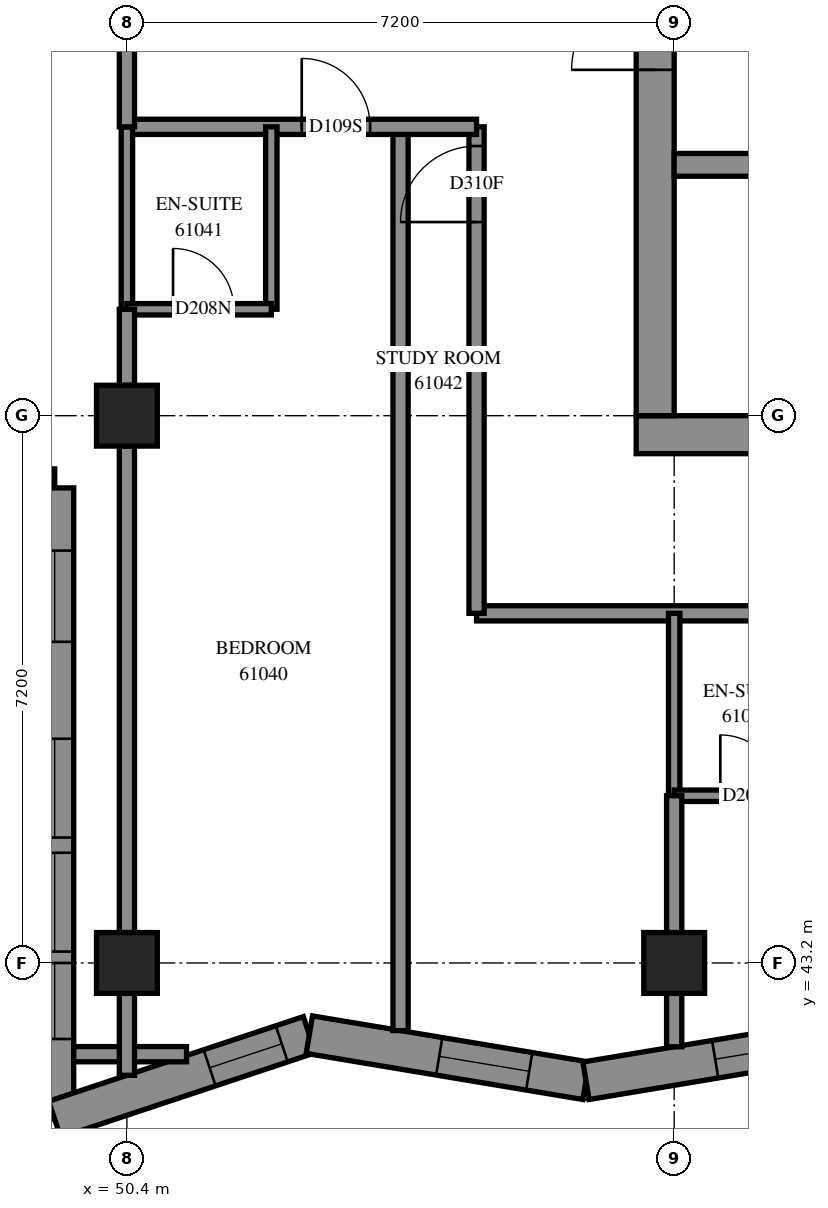
"""IFC4 building model, lengths in metres.
Left out: names, types, materials, properties, quantities, classifications, styles, units other than length and angle.
Written with IfcOpenShell. Run it as: python <this file> out.ifc"""

import sys

from ifc_helpers import new_model, si_unit, direction, frame, frame_2d, origin, origin_2d, place, context, subcontext, project, spatial, polyline, rectangle, outline, extrude, element, fill, save


model = new_model("IFC4")
c1 = context("Model", 3, precision=1e-05, world=origin(), true_north=direction((0.0, 1.0)))
c2 = subcontext(c1, "Body", "Model", "MODEL_VIEW")
j1 = project(units=[si_unit("LENGTHUNIT", "METRE"), si_unit("PLANEANGLEUNIT", "RADIAN")], contexts=[c1])
p1 = place(None, origin())
s1 = spatial("IfcSite", under=j1, at=p1, CompositionType="ELEMENT")
p2 = place(p1, origin())
s2 = spatial("IfcBuilding", under=s1, at=p2, CompositionType="ELEMENT")
p3 = place(p2, frame((0.0, 0.0, 223.6)))
s3 = spatial("IfcBuildingStorey", under=s2, at=p3, CompositionType="ELEMENT", Elevation=223.6)
for number, where, z_axis, x_axis in (
    (1, (50.4, 43.2, 0.0), (0.0, 0.0, 1.0), (1.0, 0.0, 0.0)),
    (2, (50.4, 50.4, 0.0), (0.0, 0.0, 1.0), (1.0, 0.0, 0.0)),
    (3, (57.6, 43.2, 0.0), (0.0, 0.0, 1.0), (1.0, 0.0, 0.0)),
):
    element("IfcColumn", number, at=place(p3, frame(where, z_axis=z_axis, x_axis=x_axis)), inside=s3, PredefinedType="COLUMN", context=c2, shape_type="SweptSolid", body=[
        extrude(rectangle(XDim=0.8, YDim=0.8, at=origin_2d()), origin(), (0.0, 0.0, 1.0), 3.1),
    ])
p4 = place(p3, frame((57.1, 50.15, -0.3), z_axis=(0.0, 0.0, 1.0), x_axis=(1.0, 0.0, 0.0)))
e4 = element("IfcWall", 4, at=p4, inside=s3, PredefinedType="SHEAR", context=c2, shape_type="SweptSolid", body=[
    extrude(rectangle(XDim=15.4, YDim=0.5, at=frame_2d((7.7, 0.0))), origin(), (0.0, 0.0, 1.0), 2.7),
])
p5 = place(p3, frame((57.35, 50.4, -0.3), z_axis=(0.0, 0.0, 1.0), x_axis=(0.0, 1.0, 0.0)))
e5 = element("IfcWall", 5, at=p5, inside=s3, PredefinedType="SHEAR", context=c2, shape_type="SweptSolid", body=[
    extrude(rectangle(XDim=14.4, YDim=0.5, at=frame_2d((7.2, 0.0))), origin(), (0.0, 0.0, 1.0), 2.7),
])
p6 = place(p5, frame((4.55, 0.0, 0.3)))
e6 = element("IfcOpeningElement", 6, at=p6, cuts=e5, PredefinedType="OPENING", context=c2, shape_type="SweptSolid", body=[
    extrude(rectangle(XDim=1.1, YDim=2.1, at=frame_2d((0.55, 1.05))), frame((0.0, 0.26, 0.0), z_axis=(0.0, -1.0, 0.0), x_axis=(1.0, 0.0, 0.0)), (0.0, 0.0, 1.0), 0.52),
])
p7 = place(p5, frame((11.35, 0.0, 0.3)))
e7 = element("IfcOpeningElement", 7, at=p7, cuts=e5, PredefinedType="OPENING", context=c2, shape_type="SweptSolid", body=[
    extrude(rectangle(XDim=1.1, YDim=2.1, at=frame_2d((0.55, 1.05))), frame((0.0, 0.26, 0.0), z_axis=(0.0, -1.0, 0.0), x_axis=(1.0, 0.0, 0.0)), (0.0, 0.0, 1.0), 0.52),
])
p8 = place(p3, frame((57.6, 53.7, 0.0), z_axis=(0.0, 0.0, 1.0), x_axis=(1.0, 0.0, 0.0)))
e8 = element("IfcWall", 8, at=p8, inside=s3, PredefinedType="SOLIDWALL", context=c2, shape_type="SweptSolid", body=[
    extrude(rectangle(XDim=14.4, YDim=0.3, at=frame_2d((7.2, 0.0))), origin(), (0.0, 0.0, 1.0), 3.1),
])
p9 = place(p8, frame((1.35, 0.0, 0.0)))
e9 = element("IfcOpeningElement", 9, at=p9, cuts=e8, PredefinedType="OPENING", context=c2, shape_type="SweptSolid", body=[
    extrude(rectangle(XDim=0.9, YDim=2.1, at=frame_2d((0.45, 1.05))), frame((0.0, 0.16, 0.0), z_axis=(0.0, -1.0, 0.0), x_axis=(1.0, 0.0, 0.0)), (0.0, 0.0, 1.0), 0.32),
])
p10 = place(p8, frame((4.95, 0.0, 0.0)))
e10 = element("IfcOpeningElement", 10, at=p10, cuts=e8, PredefinedType="OPENING", context=c2, shape_type="SweptSolid", body=[
    extrude(rectangle(XDim=0.9, YDim=2.1, at=frame_2d((0.45, 1.05))), frame((0.0, 0.16, 0.0), z_axis=(0.0, -1.0, 0.0), x_axis=(1.0, 0.0, 0.0)), (0.0, 0.0, 1.0), 0.32),
])
p11 = place(p8, frame((8.55, 0.0, 0.0)))
e11 = element("IfcOpeningElement", 11, at=p11, cuts=e8, PredefinedType="OPENING", context=c2, shape_type="SweptSolid", body=[
    extrude(rectangle(XDim=0.9, YDim=2.1, at=frame_2d((0.45, 1.05))), frame((0.0, 0.16, 0.0), z_axis=(0.0, -1.0, 0.0), x_axis=(1.0, 0.0, 0.0)), (0.0, 0.0, 1.0), 0.32),
])
p12 = place(p8, frame((12.05, 0.0, 0.0)))
e12 = element("IfcOpeningElement", 12, at=p12, cuts=e8, PredefinedType="OPENING", context=c2, shape_type="SweptSolid", body=[
    extrude(rectangle(XDim=1.1, YDim=2.1, at=frame_2d((0.55, 1.05))), frame((0.0, 0.16, 0.0), z_axis=(0.0, -1.0, 0.0), x_axis=(1.0, 0.0, 0.0)), (0.0, 0.0, 1.0), 0.32),
])
p13 = place(p3, frame((42.25, 49.45, 0.0), z_axis=(0.0, 0.0, 1.0), x_axis=(1.0, 0.0, 0.0)))
e13 = element("IfcWall", 13, at=p13, inside=s3, PredefinedType="SOLIDWALL", context=c2, shape_type="SweptSolid", body=[
    extrude(outline(polyline([(-0.25, -0.25), (6.95, -0.25), (7.45, 0.25), (0.25, 0.25), (-0.25, -0.25)])), origin(), (0.0, 0.0, 1.0), 3.1),
])
p14 = place(p13, frame((1.35, 0.0, 0.45)))
e14 = element("IfcOpeningElement", 14, at=p14, cuts=e13, PredefinedType="OPENING", context=c2, shape_type="SweptSolid", body=[
    extrude(rectangle(XDim=1.3, YDim=2.5, at=frame_2d((0.65, 1.25))), frame((0.0, 0.26, 0.0), z_axis=(0.0, -1.0, 0.0), x_axis=(1.0, 0.0, 0.0)), (0.0, 0.0, 1.0), 0.52),
])
p15 = place(p13, frame((2.85, 0.0, 0.45)))
e15 = element("IfcOpeningElement", 15, at=p15, cuts=e13, PredefinedType="OPENING", context=c2, shape_type="SweptSolid", body=[
    extrude(rectangle(XDim=1.3, YDim=2.5, at=frame_2d((0.65, 1.25))), frame((0.0, 0.26, 0.0), z_axis=(0.0, -1.0, 0.0), x_axis=(1.0, 0.0, 0.0)), (0.0, 0.0, 1.0), 0.52),
])
p16 = place(p13, frame((5.175, 0.0, 0.45)))
e16 = element("IfcOpeningElement", 16, at=p16, cuts=e13, PredefinedType="OPENING", context=c2, shape_type="SweptSolid", body=[
    extrude(rectangle(XDim=1.2, YDim=2.5, at=frame_2d((0.6, 1.25))), frame((0.0, 0.26, 0.0), z_axis=(0.0, -1.0, 0.0), x_axis=(1.0, 0.0, 0.0)), (0.0, 0.0, 1.0), 0.52),
])
p17 = place(p3, frame((49.45, 49.45, 0.0), z_axis=(0.0, 0.0, 1.0), x_axis=(0.0, -1.0, 0.0)))
e17 = element("IfcWall", 17, at=p17, inside=s3, PredefinedType="SOLIDWALL", context=c2, shape_type="SweptSolid", body=[
    extrude(outline(polyline([(0.25, -0.25), (8.653, -0.25), (7.96, 0.25), (-0.25, 0.25), (0.25, -0.25)])), origin(), (0.0, 0.0, 1.0), 3.1),
])
p18 = place(p17, frame((3.3, 0.0, 0.45)))
e18 = element("IfcOpeningElement", 18, at=p18, cuts=e17, PredefinedType="OPENING", context=c2, shape_type="SweptSolid", body=[
    extrude(rectangle(XDim=1.3, YDim=2.5, at=frame_2d((0.65, 1.25))), frame((0.0, 0.26, 0.0), z_axis=(0.0, -1.0, 0.0), x_axis=(1.0, 0.0, 0.0)), (0.0, 0.0, 1.0), 0.52),
])
p19 = place(p17, frame((4.8, 0.0, 0.45)))
e19 = element("IfcOpeningElement", 19, at=p19, cuts=e17, PredefinedType="OPENING", context=c2, shape_type="SweptSolid", body=[
    extrude(rectangle(XDim=1.3, YDim=2.5, at=frame_2d((0.65, 1.25))), frame((0.0, 0.26, 0.0), z_axis=(0.0, -1.0, 0.0), x_axis=(1.0, 0.0, 0.0)), (0.0, 0.0, 1.0), 0.52),
])
p20 = place(p17, frame((0.825, 0.0, 0.45)))
e20 = element("IfcOpeningElement", 20, at=p20, cuts=e17, PredefinedType="OPENING", context=c2, shape_type="SweptSolid", body=[
    extrude(rectangle(XDim=1.2, YDim=2.5, at=frame_2d((0.6, 1.25))), frame((0.0, 0.26, 0.0), z_axis=(0.0, -1.0, 0.0), x_axis=(1.0, 0.0, 0.0)), (0.0, 0.0, 1.0), 0.52),
])
p21 = place(p17, frame((6.25, 0.0, 0.45)))
e21 = element("IfcOpeningElement", 21, at=p21, cuts=e17, PredefinedType="OPENING", context=c2, shape_type="SweptSolid", body=[
    extrude(rectangle(XDim=1.0, YDim=2.5, at=frame_2d((0.5, 1.25))), frame((0.0, 0.26, 0.0), z_axis=(0.0, -1.0, 0.0), x_axis=(1.0, 0.0, 0.0)), (0.0, 0.0, 1.0), 0.52),
])
p22 = place(p3, frame((49.45, 41.144, 0.0), z_axis=(0.0, 0.0, 1.0), x_axis=(0.9489633816, 0.3153862716, 0.0)))
e22 = element("IfcWall", 22, at=p22, inside=s3, PredefinedType="SOLIDWALL", context=c2, shape_type="SweptSolid", body=[
    extrude(outline(polyline([(-0.346, -0.25), (3.468, -0.25), (3.592, 0.25), (0.346, 0.25), (-0.346, -0.25)])), origin(), (0.0, 0.0, 1.0), 3.1),
])
p23 = place(p22, frame((2.148, 0.0, 0.45)))
e23 = element("IfcOpeningElement", 23, at=p23, cuts=e22, PredefinedType="OPENING", context=c2, shape_type="SweptSolid", body=[
    extrude(rectangle(XDim=1.0, YDim=2.5, at=frame_2d((0.5, 1.25))), frame((0.0, 0.26, 0.0), z_axis=(0.0, -1.0, 0.0), x_axis=(1.0, 0.0, 0.0)), (0.0, 0.0, 1.0), 0.52),
])
p24 = place(p3, frame((52.8, 42.257, 0.0), z_axis=(0.0, 0.0, 1.0), x_axis=(0.986404908, -0.1643330686, 0.0)))
e24 = element("IfcWall", 24, at=p24, inside=s3, PredefinedType="SOLIDWALL", context=c2, shape_type="SweptSolid", body=[
    extrude(outline(polyline([(0.062, -0.25), (3.732, -0.25), (3.648, 0.25), (-0.062, 0.25), (0.062, -0.25)])), origin(), (0.0, 0.0, 1.0), 3.1),
])
p25 = place(p24, frame((1.733, 0.0, 0.45)))
e25 = element("IfcOpeningElement", 25, at=p25, cuts=e24, PredefinedType="OPENING", context=c2, shape_type="SweptSolid", body=[
    extrude(rectangle(XDim=1.2, YDim=2.5, at=frame_2d((0.6, 1.25))), frame((0.0, 0.26, 0.0), z_axis=(0.0, -1.0, 0.0), x_axis=(1.0, 0.0, 0.0)), (0.0, 0.0, 1.0), 0.52),
])
p26 = place(p3, frame((56.44, 41.65, 0.0), z_axis=(0.0, 0.0, 1.0), x_axis=(0.9864079133, 0.1643150285, 0.0)))
e26 = element("IfcWall", 26, at=p26, inside=s3, PredefinedType="SOLIDWALL", context=c2, shape_type="SweptSolid", body=[
    extrude(outline(polyline([(-0.042, -0.25), (3.628, -0.25), (3.711, 0.25), (0.042, 0.25), (-0.042, -0.25)])), origin(), (0.0, 0.0, 1.0), 3.1),
])
p27 = place(p26, frame((1.723, 0.0, 0.45)))
e27 = element("IfcOpeningElement", 27, at=p27, cuts=e26, PredefinedType="OPENING", context=c2, shape_type="SweptSolid", body=[
    extrude(rectangle(XDim=1.2, YDim=2.5, at=frame_2d((0.6, 1.25))), frame((0.0, 0.26, 0.0), z_axis=(0.0, -1.0, 0.0), x_axis=(1.0, 0.0, 0.0)), (0.0, 0.0, 1.0), 0.52),
])
p28 = place(p3, frame((55.0, 47.8, 0.0), z_axis=(0.0, 0.0, 1.0), x_axis=(1.0, 0.0, 0.0)))
e28 = element("IfcWall", 28, at=p28, inside=s3, PredefinedType="PARTITIONING", context=c2, shape_type="SweptSolid", body=[
    extrude(rectangle(XDim=19.266, YDim=0.2, at=frame_2d((9.633, 0.0))), origin(), (0.0, 0.0, 1.0), 3.1),
])
p29 = place(p28, frame((4.9, 0.0, 0.0)))
e29 = element("IfcOpeningElement", 29, at=p29, cuts=e28, PredefinedType="OPENING", context=c2, shape_type="SweptSolid", body=[
    extrude(rectangle(XDim=0.9, YDim=2.1, at=frame_2d((0.45, 1.05))), frame((0.0, 0.11, 0.0), z_axis=(0.0, -1.0, 0.0), x_axis=(1.0, 0.0, 0.0)), (0.0, 0.0, 1.0), 0.22),
])
p30 = place(p28, frame((6.6, 0.0, 0.0)))
e30 = element("IfcOpeningElement", 30, at=p30, cuts=e28, PredefinedType="OPENING", context=c2, shape_type="SweptSolid", body=[
    extrude(rectangle(XDim=0.9, YDim=2.1, at=frame_2d((0.45, 1.05))), frame((0.0, 0.11, 0.0), z_axis=(0.0, -1.0, 0.0), x_axis=(1.0, 0.0, 0.0)), (0.0, 0.0, 1.0), 0.22),
])
p31 = place(p28, frame((13.661, 0.0, 0.0)))
e31 = element("IfcOpeningElement", 31, at=p31, cuts=e28, PredefinedType="OPENING", context=c2, shape_type="SweptSolid", body=[
    extrude(rectangle(XDim=0.9, YDim=2.1, at=frame_2d((0.45, 1.05))), frame((0.0, 0.11, 0.0), z_axis=(0.0, -1.0, 0.0), x_axis=(1.0, 0.0, 0.0)), (0.0, 0.0, 1.0), 0.22),
])
p32 = place(p3, frame((54.0, 42.31, 0.0), z_axis=(0.0, 0.0, 1.0), x_axis=(0.0, 1.0, 0.0)))
e32 = element("IfcWall", 32, at=p32, inside=s3, PredefinedType="PARTITIONING", context=c2, shape_type="SweptSolid", body=[
    extrude(rectangle(XDim=11.89, YDim=0.2, at=frame_2d((5.945, 0.0))), origin(), (0.0, 0.0, 1.0), 3.1),
])
p33 = place(p3, frame((55.0, 47.8, 0.0), z_axis=(0.0, 0.0, 1.0), x_axis=(0.0, 1.0, 0.0)))
e33 = element("IfcWall", 33, at=p33, inside=s3, PredefinedType="PARTITIONING", context=c2, shape_type="SweptSolid", body=[
    extrude(rectangle(XDim=6.4, YDim=0.2, at=frame_2d((3.2, 0.0))), origin(), (0.0, 0.0, 1.0), 3.1),
])
p34 = place(p33, frame((5.147, 0.0, 0.0)))
e34 = element("IfcOpeningElement", 34, at=p34, cuts=e33, PredefinedType="OPENING", context=c2, shape_type="SweptSolid", body=[
    extrude(rectangle(XDim=1.0, YDim=2.1, at=frame_2d((0.5, 1.05))), frame((0.0, 0.11, 0.0), z_axis=(0.0, -1.0, 0.0), x_axis=(1.0, 0.0, 0.0)), (0.0, 0.0, 1.0), 0.22),
])
p35 = place(p3, frame((50.4, 43.6, 0.0), z_axis=(0.0, 0.0, 1.0), x_axis=(0.0, 1.0, 0.0)))
e35 = element("IfcWall", 35, at=p35, inside=s3, PredefinedType="PARTITIONING", context=c2, shape_type="SweptSolid", body=[
    extrude(rectangle(XDim=6.4, YDim=0.2, at=frame_2d((3.2, 0.0))), origin(), (0.0, 0.0, 1.0), 2.6),
])
p36 = place(p3, frame((50.4, 54.2, 0.0), z_axis=(0.0, 0.0, 1.0), x_axis=(1.0, 0.0, 0.0)))
e36 = element("IfcWall", 36, at=p36, inside=s3, PredefinedType="PARTITIONING", context=c2, shape_type="SweptSolid", body=[
    extrude(rectangle(XDim=4.6, YDim=0.2, at=frame_2d((2.3, 0.0))), origin(), (0.0, 0.0, 1.0), 3.1),
])
p37 = place(p36, frame((2.3, 0.0, 0.0)))
e37 = element("IfcOpeningElement", 37, at=p37, cuts=e36, PredefinedType="OPENING", context=c2, shape_type="SweptSolid", body=[
    extrude(rectangle(XDim=0.9, YDim=2.1, at=frame_2d((0.45, 1.05))), frame((0.0, 0.11, 0.0), z_axis=(0.0, -1.0, 0.0), x_axis=(1.0, 0.0, 0.0)), (0.0, 0.0, 1.0), 0.22),
])
for number, where, z_axis, x_axis in (
    (38, (52.3, 51.8, 0.0), (0.0, 0.0, 1.0), (0.0, 1.0, 0.0)),
    (39, (50.4, 51.8, 0.0), (0.0, 0.0, 1.0), (0.0, 1.0, 0.0)),
    (40, (57.6, 45.4, 0.0), (0.0, 0.0, 1.0), (0.0, 1.0, 0.0)),
):
    element("IfcWall", number, at=place(p3, frame(where, z_axis=z_axis, x_axis=x_axis)), inside=s3, PredefinedType="PARTITIONING", context=c2, shape_type="SweptSolid", body=[
        extrude(rectangle(XDim=2.4, YDim=0.15, at=frame_2d((1.2, 0.0))), origin(), (0.0, 0.0, 1.0), 3.1),
    ])
p38 = place(p3, frame((50.4, 54.2, 0.0), z_axis=(0.0, 0.0, 1.0), x_axis=(0.0, 1.0, 0.0)))
e41 = element("IfcWall", 41, at=p38, inside=s3, PredefinedType="PARTITIONING", context=c2, shape_type="SweptSolid", body=[
    extrude(rectangle(XDim=2.0, YDim=0.2, at=frame_2d((1.0, 0.0))), origin(), (0.0, 0.0, 1.0), 3.1),
])
p39 = place(p3, frame((50.4, 51.8, 0.0), z_axis=(0.0, 0.0, 1.0), x_axis=(1.0, 0.0, 0.0)))
e42 = element("IfcWall", 42, at=p39, inside=s3, PredefinedType="PARTITIONING", context=c2, shape_type="SweptSolid", body=[
    extrude(rectangle(XDim=1.9, YDim=0.15, at=frame_2d((0.95, 0.0))), origin(), (0.0, 0.0, 1.0), 3.1),
])
p40 = place(p39, frame((0.607, 0.0, 0.0)))
e43 = element("IfcOpeningElement", 43, at=p40, cuts=e42, PredefinedType="OPENING", context=c2, shape_type="SweptSolid", body=[
    extrude(rectangle(XDim=0.8, YDim=2.1, at=frame_2d((0.4, 1.05))), frame((0.0, 0.085, 0.0), z_axis=(0.0, -1.0, 0.0), x_axis=(1.0, 0.0, 0.0)), (0.0, 0.0, 1.0), 0.17),
])
p41 = place(p3, frame((57.6, 45.4, 0.0), z_axis=(0.0, 0.0, 1.0), x_axis=(1.0, 0.0, 0.0)))
e44 = element("IfcWall", 44, at=p41, inside=s3, PredefinedType="PARTITIONING", context=c2, shape_type="SweptSolid", body=[
    extrude(rectangle(XDim=1.9, YDim=0.15, at=frame_2d((0.95, 0.0))), origin(), (0.0, 0.0, 1.0), 3.1),
])
p42 = place(p41, frame((0.607, 0.0, 0.0)))
e45 = element("IfcOpeningElement", 45, at=p42, cuts=e44, PredefinedType="OPENING", context=c2, shape_type="SweptSolid", body=[
    extrude(rectangle(XDim=0.8, YDim=2.1, at=frame_2d((0.4, 1.05))), frame((0.0, 0.085, 0.0), z_axis=(0.0, -1.0, 0.0), x_axis=(1.0, 0.0, 0.0)), (0.0, 0.0, 1.0), 0.17),
])
p43 = place(p3, frame((57.6, 43.6, 0.0), z_axis=(0.0, 0.0, 1.0), x_axis=(0.0, 1.0, 0.0)))
e46 = element("IfcWall", 46, at=p43, inside=s3, PredefinedType="PARTITIONING", context=c2, shape_type="SweptSolid", body=[
    extrude(rectangle(XDim=1.8, YDim=0.2, at=frame_2d((0.9, 0.0))), origin(), (0.0, 0.0, 1.0), 3.1),
])
p44 = place(p3, frame((49.7, 42.0, 0.0), z_axis=(0.0, 0.0, 1.0), x_axis=(1.0, 0.0, 0.0)))
e47 = element("IfcWall", 47, at=p44, inside=s3, PredefinedType="PARTITIONING", context=c2, shape_type="SweptSolid", body=[
    extrude(rectangle(XDim=1.484, YDim=0.2, at=frame_2d((0.742, 0.0))), origin(), (0.0, 0.0, 1.0), 3.1),
])
p45 = place(p3, frame((50.4, 50.8, 0.0), z_axis=(0.0, 0.0, 1.0), x_axis=(0.0, 1.0, 0.0)))
e48 = element("IfcWall", 48, at=p45, inside=s3, PredefinedType="PARTITIONING", context=c2, shape_type="SweptSolid", body=[
    extrude(rectangle(XDim=1.0, YDim=0.2, at=frame_2d((0.5, 0.0))), origin(), (0.0, 0.0, 1.0), 3.1),
])
p46 = place(p3, frame((50.4, 41.723, 0.0), z_axis=(0.0, 0.0, 1.0), x_axis=(0.0, 1.0, 0.0)))
e49 = element("IfcWall", 49, at=p46, inside=s3, PredefinedType="PARTITIONING", context=c2, shape_type="SweptSolid", body=[
    extrude(rectangle(XDim=1.077, YDim=0.2, at=frame_2d((0.539, 0.0))), origin(), (0.0, 0.0, 1.0), 3.1),
])
p47 = place(p3, frame((57.6, 42.097, 0.0), z_axis=(0.0, 0.0, 1.0), x_axis=(0.0, 1.0, 0.0)))
e50 = element("IfcWall", 50, at=p47, inside=s3, PredefinedType="PARTITIONING", context=c2, shape_type="SweptSolid", body=[
    extrude(rectangle(XDim=0.703, YDim=0.2, at=frame_2d((0.351, 0.0))), origin(), (0.0, 0.0, 1.0), 3.1),
])
p48 = place(p18, origin())
e51 = element("IfcWindow", 51, at=p48, inside=s3, PartitioningType="SINGLE_PANEL", PredefinedType="WINDOW", context=c2, shape_type="SweptSolid", body=[
    extrude(rectangle(XDim=1.3, YDim=2.5, at=frame_2d((0.65, 1.25))), frame((0.0, 0.18, 0.0), z_axis=(0.0, -1.0, 0.0), x_axis=(1.0, 0.0, 0.0)), (0.0, 0.0, 1.0), 0.06),
])
fill(e18, e51)
p49 = place(p19, origin())
e52 = element("IfcWindow", 52, at=p49, inside=s3, PartitioningType="SINGLE_PANEL", PredefinedType="WINDOW", context=c2, shape_type="SweptSolid", body=[
    extrude(rectangle(XDim=1.3, YDim=2.5, at=frame_2d((0.65, 1.25))), frame((0.0, 0.18, 0.0), z_axis=(0.0, -1.0, 0.0), x_axis=(1.0, 0.0, 0.0)), (0.0, 0.0, 1.0), 0.06),
])
fill(e19, e52)
p50 = place(p20, origin())
e53 = element("IfcWindow", 53, at=p50, inside=s3, PartitioningType="SINGLE_PANEL", PredefinedType="WINDOW", context=c2, shape_type="SweptSolid", body=[
    extrude(rectangle(XDim=1.2, YDim=2.5, at=frame_2d((0.6, 1.25))), frame((0.0, 0.18, 0.0), z_axis=(0.0, -1.0, 0.0), x_axis=(1.0, 0.0, 0.0)), (0.0, 0.0, 1.0), 0.06),
])
fill(e20, e53)
p51 = place(p25, origin())
e54 = element("IfcWindow", 54, at=p51, inside=s3, PartitioningType="SINGLE_PANEL", PredefinedType="WINDOW", context=c2, shape_type="SweptSolid", body=[
    extrude(rectangle(XDim=1.2, YDim=2.5, at=frame_2d((0.6, 1.25))), frame((0.0, 0.18, 0.0), z_axis=(0.0, -1.0, 0.0), x_axis=(1.0, 0.0, 0.0)), (0.0, 0.0, 1.0), 0.06),
])
fill(e25, e54)
p52 = place(p27, origin())
e55 = element("IfcWindow", 55, at=p52, inside=s3, PartitioningType="SINGLE_PANEL", PredefinedType="WINDOW", context=c2, shape_type="SweptSolid", body=[
    extrude(rectangle(XDim=1.2, YDim=2.5, at=frame_2d((0.6, 1.25))), frame((0.0, 0.18, 0.0), z_axis=(0.0, -1.0, 0.0), x_axis=(1.0, 0.0, 0.0)), (0.0, 0.0, 1.0), 0.06),
])
fill(e27, e55)
p53 = place(p6, origin())
e56 = element("IfcDoor", 56, at=p53, inside=s3, OperationType="DOUBLE_DOOR_SINGLE_SWING", PredefinedType="DOOR", context=c2, shape_type="SweptSolid", body=[
    extrude(rectangle(XDim=1.1, YDim=2.1, at=frame_2d((0.55, 1.05))), frame((0.0, 0.025, 0.0), z_axis=(0.0, -1.0, 0.0), x_axis=(1.0, 0.0, 0.0)), (0.0, 0.0, 1.0), 0.05),
])
fill(e6, e56)
p54 = place(p37, origin())
e57 = element("IfcDoor", 57, at=p54, inside=s3, OperationType="SINGLE_SWING_LEFT", PredefinedType="DOOR", context=c2, shape_type="SweptSolid", body=[
    extrude(rectangle(XDim=0.9, YDim=2.1, at=frame_2d((0.45, 1.05))), frame((0.0, 0.025, 0.0), z_axis=(0.0, -1.0, 0.0), x_axis=(1.0, 0.0, 0.0)), (0.0, 0.0, 1.0), 0.05),
])
fill(e37, e57)
p55 = place(p40, origin())
e58 = element("IfcDoor", 58, at=p55, inside=s3, OperationType="SINGLE_SWING_RIGHT", PredefinedType="DOOR", context=c2, shape_type="SweptSolid", body=[
    extrude(rectangle(XDim=0.8, YDim=2.1, at=frame_2d((0.4, 1.05))), frame((0.0, 0.025, 0.0), z_axis=(0.0, -1.0, 0.0), x_axis=(1.0, 0.0, 0.0)), (0.0, 0.0, 1.0), 0.05),
])
fill(e43, e58)
p56 = place(p34, origin())
e59 = element("IfcDoor", 59, at=p56, inside=s3, OperationType="SINGLE_SWING_RIGHT", PredefinedType="DOOR", context=c2, shape_type="SweptSolid", body=[
    extrude(rectangle(XDim=1.0, YDim=2.1, at=frame_2d((0.5, 1.05))), frame((0.0, 0.025, 0.0), z_axis=(0.0, -1.0, 0.0), x_axis=(1.0, 0.0, 0.0)), (0.0, 0.0, 1.0), 0.05),
])
fill(e34, e59)
p57 = place(p42, origin())
e60 = element("IfcDoor", 60, at=p57, inside=s3, OperationType="SINGLE_SWING_RIGHT", PredefinedType="DOOR", context=c2, shape_type="SweptSolid", body=[
    extrude(rectangle(XDim=0.8, YDim=2.1, at=frame_2d((0.4, 1.05))), frame((0.0, 0.025, 0.0), z_axis=(0.0, -1.0, 0.0), x_axis=(1.0, 0.0, 0.0)), (0.0, 0.0, 1.0), 0.05),
])
fill(e45, e60)
p58 = place(p21, origin())
e61 = element("IfcWindow", 61, at=p58, inside=s3, PartitioningType="SINGLE_PANEL", PredefinedType="WINDOW", context=c2, shape_type="SweptSolid", body=[
    extrude(rectangle(XDim=1.0, YDim=2.5, at=frame_2d((0.5, 1.25))), frame((0.0, 0.18, 0.0), z_axis=(0.0, -1.0, 0.0), x_axis=(1.0, 0.0, 0.0)), (0.0, 0.0, 1.0), 0.06),
])
fill(e21, e61)
p59 = place(p23, origin())
e62 = element("IfcWindow", 62, at=p59, inside=s3, PartitioningType="SINGLE_PANEL", PredefinedType="WINDOW", context=c2, shape_type="SweptSolid", body=[
    extrude(rectangle(XDim=1.0, YDim=2.5, at=frame_2d((0.5, 1.25))), frame((0.0, 0.18, 0.0), z_axis=(0.0, -1.0, 0.0), x_axis=(1.0, 0.0, 0.0)), (0.0, 0.0, 1.0), 0.06),
])
fill(e23, e62)
save(model, sys.argv[1])
